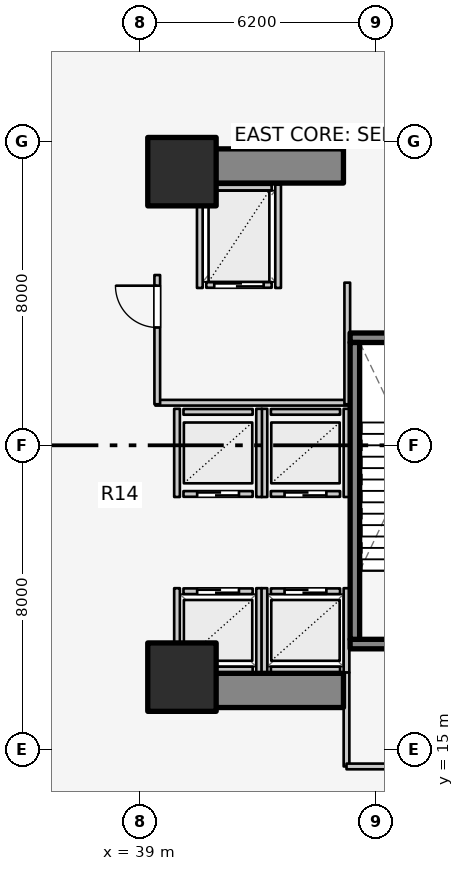
"""IFC4 building model, lengths in metres.
Left out: names, types, materials, properties, quantities, classifications, styles, units other than length and angle.
Written with IfcOpenShell. Run it as: python <this file> out.ifc"""

import sys

from ifc_helpers import new_model, si_unit, direction, frame, frame_2d, origin, origin_2d, place, context, subcontext, project, spatial, rectangle, extrude, element, fill, save


model = new_model("IFC4")
c1 = context("Model", 3, precision=1e-05, world=origin(), true_north=direction((0.0, 1.0)))
c2 = subcontext(c1, "Body", "Model", "MODEL_VIEW")
j1 = project(units=[si_unit("LENGTHUNIT", "METRE"), si_unit("PLANEANGLEUNIT", "RADIAN")], contexts=[c1])
p1 = place(None, origin())
s1 = spatial("IfcSite", under=j1, at=p1, CompositionType="ELEMENT")
p2 = place(p1, origin())
s2 = spatial("IfcBuilding", under=s1, at=p2, CompositionType="ELEMENT")
p3 = place(p2, origin())
s3 = spatial("IfcBuildingStorey", under=s2, at=p3, CompositionType="ELEMENT", Elevation=0.0)
for number, where, z_axis, x_axis in (
    (1, (39.85, 16.55, 0.0), (0.0, 0.0, 1.0), (1.0, 0.0, 0.0)),
    (2, (39.85, 30.35, 0.0), (0.0, 0.0, 1.0), (1.0, 0.0, 0.0)),
):
    element("IfcWall", number, at=place(p3, frame(where, z_axis=z_axis, x_axis=x_axis)), inside=s3, PredefinedType="SHEAR", context=c2, shape_type="SweptSolid", body=[
        extrude(rectangle(XDim=4.5, YDim=0.9, at=frame_2d((2.25, 0.0))), origin(), (0.0, 0.0, 1.0), 4.6),
    ])
p4 = place(p3, frame((44.525, 17.77, 0.0), z_axis=(0.0, 0.0, 1.0), x_axis=(1.0, 0.0, 0.0)))
e3 = element("IfcWall", 3, at=p4, inside=s3, PredefinedType="SOLIDWALL", context=c2, shape_type="SweptSolid", body=[
    extrude(rectangle(XDim=3.37, YDim=0.25, at=frame_2d((1.685, 0.0))), origin(), (0.0, 0.0, 1.0), 4.6),
])
p5 = place(p4, frame((1.135, 0.0, 0.0)))
e4 = element("IfcOpeningElement", 4, at=p5, cuts=e3, PredefinedType="OPENING", context=c2, shape_type="SweptSolid", body=[
    extrude(rectangle(XDim=1.1, YDim=2.1, at=frame_2d((0.55, 1.05))), frame((0.0, 0.135, 0.0), z_axis=(0.0, -1.0, 0.0), x_axis=(1.0, 0.0, 0.0)), (0.0, 0.0, 1.0), 0.27),
])
p6 = place(p3, frame((44.525, 25.83, 0.0), z_axis=(0.0, 0.0, 1.0), x_axis=(1.0, 0.0, 0.0)))
e5 = element("IfcWall", 5, at=p6, inside=s3, PredefinedType="SOLIDWALL", context=c2, shape_type="SweptSolid", body=[
    extrude(rectangle(XDim=3.37, YDim=0.25, at=frame_2d((1.685, 0.0))), origin(), (0.0, 0.0, 1.0), 4.6),
])
p7 = place(p3, frame((44.65, 17.895, 0.0), z_axis=(0.0, 0.0, 1.0), x_axis=(0.0, 1.0, 0.0)))
e6 = element("IfcWall", 6, at=p7, inside=s3, PredefinedType="SOLIDWALL", context=c2, shape_type="SweptSolid", body=[
    extrude(rectangle(XDim=7.81, YDim=0.25, at=frame_2d((3.905, 0.0))), origin(), (0.0, 0.0, 1.0), 4.6),
])
for number, where, z_axis, x_axis in (
    (7, (40.1, 16.9, 0.0), (0.0, 0.0, 1.0), (1.0, 0.0, 0.0)),
    (8, (40.1, 30.2, 0.0), (0.0, 0.0, 1.0), (1.0, 0.0, 0.0)),
):
    element("IfcColumn", number, at=place(p3, frame(where, z_axis=z_axis, x_axis=x_axis)), inside=s3, PredefinedType="COLUMN", context=c2, shape_type="SweptSolid", body=[
        extrude(rectangle(XDim=1.8, YDim=1.8, at=origin_2d()), origin(), (0.0, 0.0, 1.0), 4.6),
    ])
p8 = place(p3, frame((40.14, 19.16, 0.0), z_axis=(0.0, 0.0, 1.0), x_axis=(1.0, 0.0, 0.0)))
e9 = element("IfcWall", 9, at=p8, inside=s3, PredefinedType="SOLIDWALL", context=c2, shape_type="SweptSolid", body=[
    extrude(rectangle(XDim=1.82, YDim=0.15, at=frame_2d((0.91, 0.0))), origin(), (0.0, 0.0, 1.0), 3.62),
])
p9 = place(p8, frame((0.36, 0.0, 0.0)))
e10 = element("IfcOpeningElement", 10, at=p9, cuts=e9, PredefinedType="OPENING", context=c2, shape_type="SweptSolid", body=[
    extrude(rectangle(XDim=1.1, YDim=2.1, at=frame_2d((0.55, 1.05))), frame((0.0, 0.085, 0.0), z_axis=(0.0, -1.0, 0.0), x_axis=(1.0, 0.0, 0.0)), (0.0, 0.0, 1.0), 0.17),
])
p10 = place(p3, frame((40.14, 17.1, 0.0), z_axis=(0.0, 0.0, 1.0), x_axis=(1.0, 0.0, 0.0)))
e11 = element("IfcWall", 11, at=p10, inside=s3, PredefinedType="SOLIDWALL", context=c2, shape_type="SweptSolid", body=[
    extrude(rectangle(XDim=1.82, YDim=0.15, at=frame_2d((0.91, 0.0))), origin(), (0.0, 0.0, 1.0), 3.62),
])
p11 = place(p3, frame((39.97, 17.02, 0.0), z_axis=(0.0, 0.0, 1.0), x_axis=(0.0, 1.0, 0.0)))
e12 = element("IfcWall", 12, at=p11, inside=s3, PredefinedType="SOLIDWALL", context=c2, shape_type="SweptSolid", body=[
    extrude(rectangle(XDim=2.22, YDim=0.15, at=frame_2d((1.11, 0.0))), origin(), (0.0, 0.0, 1.0), 3.3),
])
p12 = place(p3, frame((42.13, 17.02, 0.0), z_axis=(0.0, 0.0, 1.0), x_axis=(0.0, 1.0, 0.0)))
e13 = element("IfcWall", 13, at=p12, inside=s3, PredefinedType="SOLIDWALL", context=c2, shape_type="SweptSolid", body=[
    extrude(rectangle(XDim=2.22, YDim=0.15, at=frame_2d((1.11, 0.0))), origin(), (0.0, 0.0, 1.0), 4.255),
])
p13 = place(p3, frame((42.44, 19.16, 0.0), z_axis=(0.0, 0.0, 1.0), x_axis=(1.0, 0.0, 0.0)))
e14 = element("IfcWall", 14, at=p13, inside=s3, PredefinedType="SOLIDWALL", context=c2, shape_type="SweptSolid", body=[
    extrude(rectangle(XDim=1.82, YDim=0.15, at=frame_2d((0.91, 0.0))), origin(), (0.0, 0.0, 1.0), 4.255),
])
p14 = place(p13, frame((0.36, 0.0, 0.0)))
e15 = element("IfcOpeningElement", 15, at=p14, cuts=e14, PredefinedType="OPENING", context=c2, shape_type="SweptSolid", body=[
    extrude(rectangle(XDim=1.1, YDim=2.1, at=frame_2d((0.55, 1.05))), frame((0.0, 0.085, 0.0), z_axis=(0.0, -1.0, 0.0), x_axis=(1.0, 0.0, 0.0)), (0.0, 0.0, 1.0), 0.17),
])
p15 = place(p3, frame((42.44, 17.1, 0.0), z_axis=(0.0, 0.0, 1.0), x_axis=(1.0, 0.0, 0.0)))
e16 = element("IfcWall", 16, at=p15, inside=s3, PredefinedType="SOLIDWALL", context=c2, shape_type="SweptSolid", body=[
    extrude(rectangle(XDim=1.82, YDim=0.15, at=frame_2d((0.91, 0.0))), origin(), (0.0, 0.0, 1.0), 4.255),
])
p16 = place(p3, frame((42.27, 17.02, 0.0), z_axis=(0.0, 0.0, 1.0), x_axis=(0.0, 1.0, 0.0)))
e17 = element("IfcWall", 17, at=p16, inside=s3, PredefinedType="SOLIDWALL", context=c2, shape_type="SweptSolid", body=[
    extrude(rectangle(XDim=2.22, YDim=0.15, at=frame_2d((1.11, 0.0))), origin(), (0.0, 0.0, 1.0), 4.255),
])
p17 = place(p3, frame((44.43, 17.02, 0.0), z_axis=(0.0, 0.0, 1.0), x_axis=(0.0, 1.0, 0.0)))
e18 = element("IfcWall", 18, at=p17, inside=s3, PredefinedType="SOLIDWALL", context=c2, shape_type="SweptSolid", body=[
    extrude(rectangle(XDim=2.22, YDim=0.15, at=frame_2d((1.11, 0.0))), origin(), (0.0, 0.0, 1.0), 3.62),
])
p18 = place(p3, frame((42.44, 21.72, 0.0), z_axis=(0.0, 0.0, 1.0), x_axis=(1.0, 0.0, 0.0)))
e19 = element("IfcWall", 19, at=p18, inside=s3, PredefinedType="SOLIDWALL", context=c2, shape_type="SweptSolid", body=[
    extrude(rectangle(XDim=1.82, YDim=0.15, at=frame_2d((0.91, 0.0))), origin(), (0.0, 0.0, 1.0), 4.255),
])
p19 = place(p18, frame((0.36, 0.0, 0.0)))
e20 = element("IfcOpeningElement", 20, at=p19, cuts=e19, PredefinedType="OPENING", context=c2, shape_type="SweptSolid", body=[
    extrude(rectangle(XDim=1.1, YDim=2.1, at=frame_2d((0.55, 1.05))), frame((0.0, 0.085, 0.0), z_axis=(0.0, -1.0, 0.0), x_axis=(1.0, 0.0, 0.0)), (0.0, 0.0, 1.0), 0.17),
])
p20 = place(p3, frame((42.44, 23.88, 0.0), z_axis=(0.0, 0.0, 1.0), x_axis=(1.0, 0.0, 0.0)))
e21 = element("IfcWall", 21, at=p20, inside=s3, PredefinedType="SOLIDWALL", context=c2, shape_type="SweptSolid", body=[
    extrude(rectangle(XDim=1.82, YDim=0.15, at=frame_2d((0.91, 0.0))), origin(), (0.0, 0.0, 1.0), 4.255),
])
for number, where, z_axis, x_axis in (
    (22, (42.27, 21.64, 0.0), (0.0, 0.0, 1.0), (0.0, 1.0, 0.0)),
    (23, (44.43, 21.64, 0.0), (0.0, 0.0, 1.0), (0.0, 1.0, 0.0)),
):
    element("IfcWall", number, at=place(p3, frame(where, z_axis=z_axis, x_axis=x_axis)), inside=s3, PredefinedType="SOLIDWALL", context=c2, shape_type="SweptSolid", body=[
        extrude(rectangle(XDim=2.32, YDim=0.15, at=frame_2d((1.16, 0.0))), origin(), (0.0, 0.0, 1.0), 4.255),
    ])
p21 = place(p3, frame((40.14, 21.72, 0.0), z_axis=(0.0, 0.0, 1.0), x_axis=(1.0, 0.0, 0.0)))
e24 = element("IfcWall", 24, at=p21, inside=s3, PredefinedType="SOLIDWALL", context=c2, shape_type="SweptSolid", body=[
    extrude(rectangle(XDim=1.82, YDim=0.15, at=frame_2d((0.91, 0.0))), origin(), (0.0, 0.0, 1.0), 3.62),
])
p22 = place(p21, frame((0.36, 0.0, 0.0)))
e25 = element("IfcOpeningElement", 25, at=p22, cuts=e24, PredefinedType="OPENING", context=c2, shape_type="SweptSolid", body=[
    extrude(rectangle(XDim=1.1, YDim=2.1, at=frame_2d((0.55, 1.05))), frame((0.0, 0.085, 0.0), z_axis=(0.0, -1.0, 0.0), x_axis=(1.0, 0.0, 0.0)), (0.0, 0.0, 1.0), 0.17),
])
p23 = place(p3, frame((40.14, 23.88, 0.0), z_axis=(0.0, 0.0, 1.0), x_axis=(1.0, 0.0, 0.0)))
e26 = element("IfcWall", 26, at=p23, inside=s3, PredefinedType="SOLIDWALL", context=c2, shape_type="SweptSolid", body=[
    extrude(rectangle(XDim=1.82, YDim=0.15, at=frame_2d((0.91, 0.0))), origin(), (0.0, 0.0, 1.0), 3.62),
])
p24 = place(p3, frame((39.97, 21.64, 0.0), z_axis=(0.0, 0.0, 1.0), x_axis=(0.0, 1.0, 0.0)))
e27 = element("IfcWall", 27, at=p24, inside=s3, PredefinedType="SOLIDWALL", context=c2, shape_type="SweptSolid", body=[
    extrude(rectangle(XDim=2.32, YDim=0.15, at=frame_2d((1.16, 0.0))), origin(), (0.0, 0.0, 1.0), 3.62),
])
p25 = place(p3, frame((42.13, 21.64, 0.0), z_axis=(0.0, 0.0, 1.0), x_axis=(0.0, 1.0, 0.0)))
e28 = element("IfcWall", 28, at=p25, inside=s3, PredefinedType="SOLIDWALL", context=c2, shape_type="SweptSolid", body=[
    extrude(rectangle(XDim=2.32, YDim=0.15, at=frame_2d((1.16, 0.0))), origin(), (0.0, 0.0, 1.0), 4.255),
])
p26 = place(p3, frame((40.74, 27.22, 0.0), z_axis=(0.0, 0.0, 1.0), x_axis=(1.0, 0.0, 0.0)))
e29 = element("IfcWall", 29, at=p26, inside=s3, PredefinedType="SOLIDWALL", context=c2, shape_type="SweptSolid", body=[
    extrude(rectangle(XDim=1.72, YDim=0.15, at=frame_2d((0.86, 0.0))), origin(), (0.0, 0.0, 1.0), 4.255),
])
p27 = place(p26, frame((0.21, 0.0, 0.0)))
e30 = element("IfcOpeningElement", 30, at=p27, cuts=e29, PredefinedType="OPENING", context=c2, shape_type="SweptSolid", body=[
    extrude(rectangle(XDim=1.3, YDim=2.1, at=frame_2d((0.65, 1.05))), frame((0.0, 0.085, 0.0), z_axis=(0.0, -1.0, 0.0), x_axis=(1.0, 0.0, 0.0)), (0.0, 0.0, 1.0), 0.17),
])
p28 = place(p3, frame((40.74, 29.78, 0.0), z_axis=(0.0, 0.0, 1.0), x_axis=(1.0, 0.0, 0.0)))
e31 = element("IfcWall", 31, at=p28, inside=s3, PredefinedType="SOLIDWALL", context=c2, shape_type="SweptSolid", body=[
    extrude(rectangle(XDim=1.72, YDim=0.15, at=frame_2d((0.86, 0.0))), origin(), (0.0, 0.0, 1.0), 4.255),
])
for number, where, z_axis, x_axis in (
    (32, (40.57, 27.14, 0.0), (0.0, 0.0, 1.0), (0.0, 1.0, 0.0)),
    (33, (42.63, 27.14, 0.0), (0.0, 0.0, 1.0), (0.0, 1.0, 0.0)),
):
    element("IfcWall", number, at=place(p3, frame(where, z_axis=z_axis, x_axis=x_axis)), inside=s3, PredefinedType="SOLIDWALL", context=c2, shape_type="SweptSolid", body=[
        extrude(rectangle(XDim=2.72, YDim=0.15, at=frame_2d((1.36, 0.0))), origin(), (0.0, 0.0, 1.0), 4.255),
    ])
p29 = place(p3, frame((39.4, 24.12, 0.0), z_axis=(0.0, 0.0, 1.0), x_axis=(1.0, 0.0, 0.0)))
e34 = element("IfcWall", 34, at=p29, inside=s3, PredefinedType="PARTITIONING", context=c2, shape_type="SweptSolid", body=[
    extrude(rectangle(XDim=5.08, YDim=0.15, at=frame_2d((2.54, 0.0))), origin(), (0.0, 0.0, 1.0), 3.62),
])
p30 = place(p3, frame((44.45, 24.08, 0.0), z_axis=(0.0, 0.0, 1.0), x_axis=(0.0, 1.0, 0.0)))
e35 = element("IfcWall", 35, at=p30, inside=s3, PredefinedType="PARTITIONING", context=c2, shape_type="SweptSolid", body=[
    extrude(rectangle(XDim=3.2, YDim=0.15, at=frame_2d((1.6, 0.0))), origin(), (0.0, 0.0, 1.0), 4.255),
])
p31 = place(p3, frame((39.45, 24.08, 0.0), z_axis=(0.0, 0.0, 1.0), x_axis=(0.0, 1.0, 0.0)))
e36 = element("IfcWall", 36, at=p31, inside=s3, PredefinedType="PARTITIONING", context=c2, shape_type="SweptSolid", body=[
    extrude(rectangle(XDim=3.4, YDim=0.15, at=frame_2d((1.7, 0.0))), origin(), (0.0, 0.0, 1.0), 4.255),
])
p32 = place(p31, frame((2.02, 0.0, 0.0)))
e37 = element("IfcOpeningElement", 37, at=p32, cuts=e36, PredefinedType="OPENING", context=c2, shape_type="SweptSolid", body=[
    extrude(rectangle(XDim=1.1, YDim=2.1, at=frame_2d((0.55, 1.05))), frame((0.0, 0.085, 0.0), z_axis=(0.0, -1.0, 0.0), x_axis=(1.0, 0.0, 0.0)), (0.0, 0.0, 1.0), 0.17),
])
p33 = place(p3, frame((44.43, 14.55, 0.0), z_axis=(0.0, 0.0, 1.0), x_axis=(0.0, 1.0, 0.0)))
e38 = element("IfcWall", 38, at=p33, inside=s3, PredefinedType="PARTITIONING", context=c2, shape_type="SweptSolid", body=[
    extrude(rectangle(XDim=2.47, YDim=0.15, at=frame_2d((1.235, 0.0))), origin(), (0.0, 0.0, 1.0), 4.255),
])
p34 = place(p3, frame((44.43, 14.55, 0.0), z_axis=(0.0, 0.0, 1.0), x_axis=(1.0, 0.0, 0.0)))
e39 = element("IfcWall", 39, at=p34, inside=s3, PredefinedType="PARTITIONING", context=c2, shape_type="SweptSolid", body=[
    extrude(rectangle(XDim=19.35, YDim=0.15, at=frame_2d((9.675, 0.0))), origin(), (0.0, 0.0, 1.0), 3.3),
])
p35 = place(p34, frame((1.45, 0.0, 0.0)))
e40 = element("IfcOpeningElement", 40, at=p35, cuts=e39, PredefinedType="OPENING", context=c2, shape_type="SweptSolid", body=[
    extrude(rectangle(XDim=1.1, YDim=2.1, at=frame_2d((0.55, 1.05))), frame((0.0, 0.085, 0.0), z_axis=(0.0, -1.0, 0.0), x_axis=(1.0, 0.0, 0.0)), (0.0, 0.0, 1.0), 0.17),
])
p36 = place(p34, frame((6.85, 0.0, 0.0)))
e41 = element("IfcOpeningElement", 41, at=p36, cuts=e39, PredefinedType="OPENING", context=c2, shape_type="SweptSolid", body=[
    extrude(rectangle(XDim=1.1, YDim=2.1, at=frame_2d((0.55, 1.05))), frame((0.0, 0.085, 0.0), z_axis=(0.0, -1.0, 0.0), x_axis=(1.0, 0.0, 0.0)), (0.0, 0.0, 1.0), 0.17),
])
p37 = place(p34, frame((15.85, 0.0, 0.0)))
e42 = element("IfcOpeningElement", 42, at=p37, cuts=e39, PredefinedType="OPENING", context=c2, shape_type="SweptSolid", body=[
    extrude(rectangle(XDim=1.1, YDim=2.1, at=frame_2d((0.55, 1.05))), frame((0.0, 0.085, 0.0), z_axis=(0.0, -1.0, 0.0), x_axis=(1.0, 0.0, 0.0)), (0.0, 0.0, 1.0), 0.17),
])
p38 = place(p9, origin())
e43 = element("IfcDoor", 43, at=p38, inside=s3, OperationType="DOUBLE_DOOR_SLIDING", PredefinedType="DOOR", context=c2, shape_type="SweptSolid", body=[
    extrude(rectangle(XDim=1.1, YDim=2.1, at=frame_2d((0.55, 1.05))), frame((0.0, 0.025, 0.0), z_axis=(0.0, -1.0, 0.0), x_axis=(1.0, 0.0, 0.0)), (0.0, 0.0, 1.0), 0.05),
])
fill(e10, e43)
p39 = place(p14, origin())
e44 = element("IfcDoor", 44, at=p39, inside=s3, OperationType="DOUBLE_DOOR_SLIDING", PredefinedType="DOOR", context=c2, shape_type="SweptSolid", body=[
    extrude(rectangle(XDim=1.1, YDim=2.1, at=frame_2d((0.55, 1.05))), frame((0.0, 0.025, 0.0), z_axis=(0.0, -1.0, 0.0), x_axis=(1.0, 0.0, 0.0)), (0.0, 0.0, 1.0), 0.05),
])
fill(e15, e44)
p40 = place(p19, origin())
e45 = element("IfcDoor", 45, at=p40, inside=s3, OperationType="DOUBLE_DOOR_SLIDING", PredefinedType="DOOR", context=c2, shape_type="SweptSolid", body=[
    extrude(rectangle(XDim=1.1, YDim=2.1, at=frame_2d((0.55, 1.05))), frame((0.0, 0.025, 0.0), z_axis=(0.0, -1.0, 0.0), x_axis=(1.0, 0.0, 0.0)), (0.0, 0.0, 1.0), 0.05),
])
fill(e20, e45)
p41 = place(p22, origin())
e46 = element("IfcDoor", 46, at=p41, inside=s3, OperationType="DOUBLE_DOOR_SLIDING", PredefinedType="DOOR", context=c2, shape_type="SweptSolid", body=[
    extrude(rectangle(XDim=1.1, YDim=2.1, at=frame_2d((0.55, 1.05))), frame((0.0, 0.025, 0.0), z_axis=(0.0, -1.0, 0.0), x_axis=(1.0, 0.0, 0.0)), (0.0, 0.0, 1.0), 0.05),
])
fill(e25, e46)
p42 = place(p27, origin())
e47 = element("IfcDoor", 47, at=p42, inside=s3, OperationType="DOUBLE_DOOR_SLIDING", PredefinedType="DOOR", context=c2, shape_type="SweptSolid", body=[
    extrude(rectangle(XDim=1.3, YDim=2.1, at=frame_2d((0.65, 1.05))), frame((0.0, 0.025, 0.0), z_axis=(0.0, -1.0, 0.0), x_axis=(1.0, 0.0, 0.0)), (0.0, 0.0, 1.0), 0.05),
])
fill(e30, e47)
p43 = place(p32, origin())
e48 = element("IfcDoor", 48, at=p43, inside=s3, OperationType="SINGLE_SWING_RIGHT", PredefinedType="DOOR", context=c2, shape_type="SweptSolid", body=[
    extrude(rectangle(XDim=1.1, YDim=2.1, at=frame_2d((0.55, 1.05))), frame((0.0, 0.025, 0.0), z_axis=(0.0, -1.0, 0.0), x_axis=(1.0, 0.0, 0.0)), (0.0, 0.0, 1.0), 0.05),
])
fill(e37, e48)
save(model, sys.argv[1])
